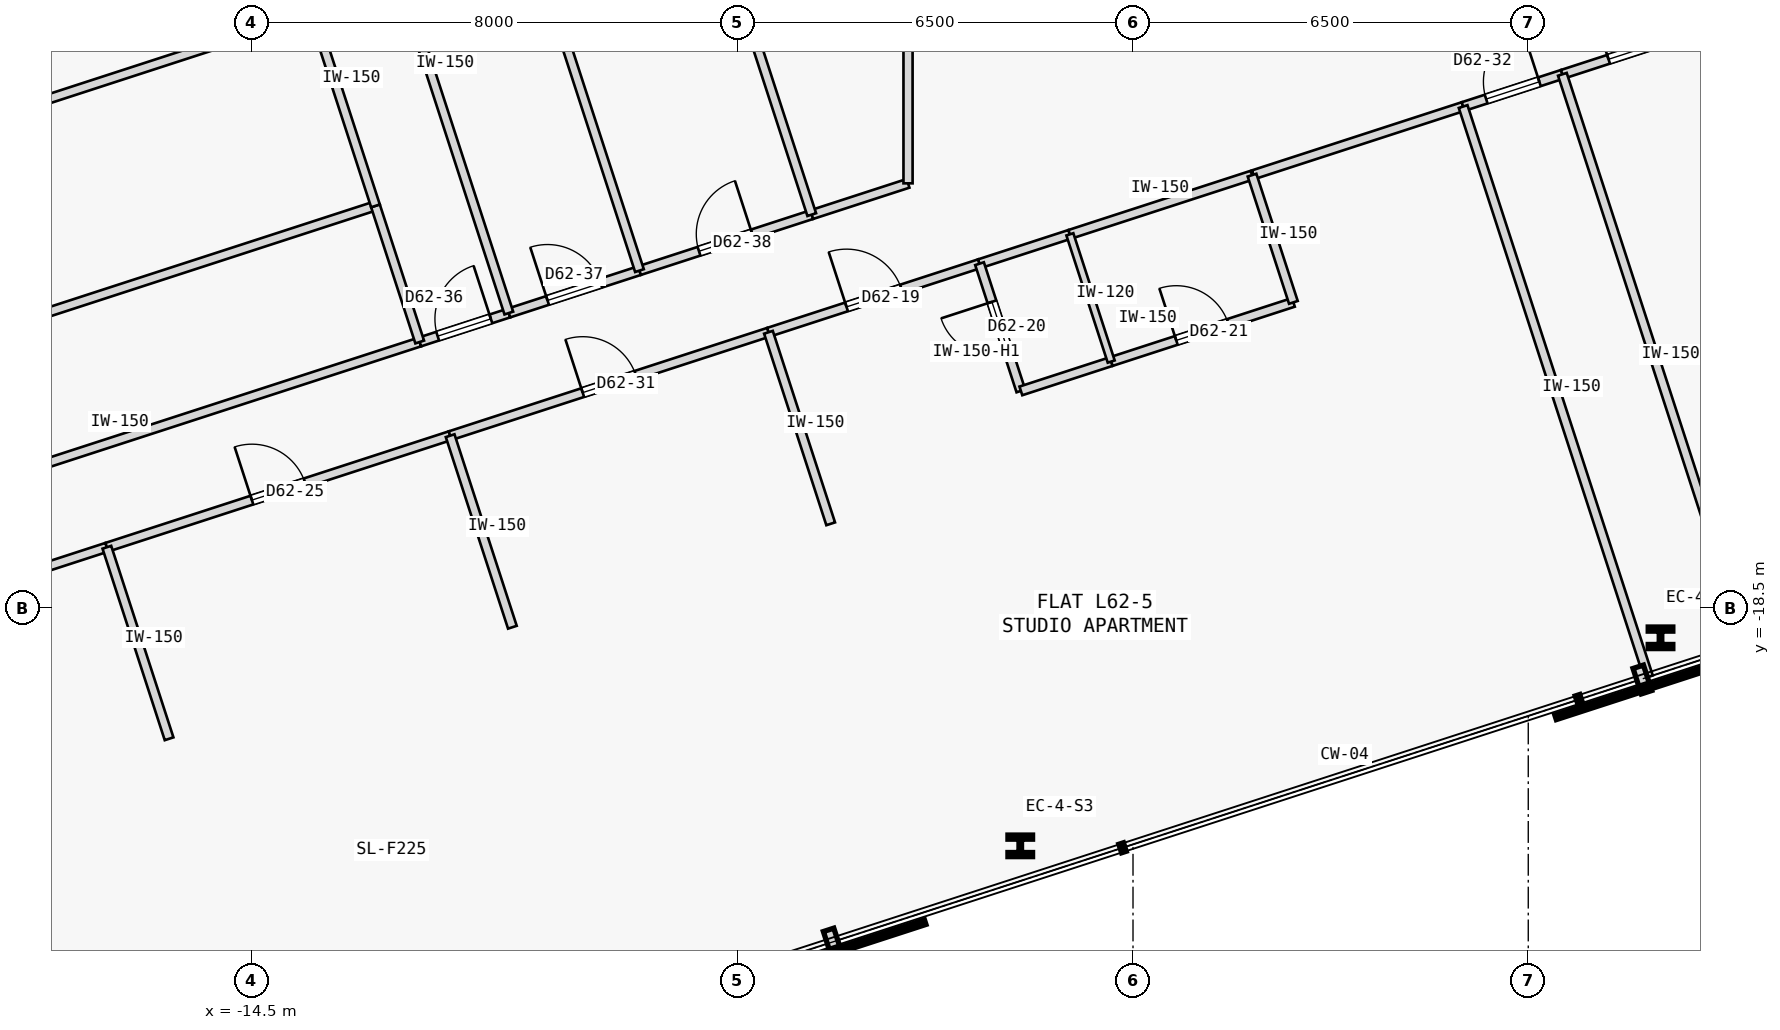
"""IFC4 building model, lengths in metres.
Left out: names, types, materials, properties, quantities, classifications, styles, units other than length and angle.
Written with IfcOpenShell. Run it as: python <this file> out.ifc"""

import sys

from ifc_helpers import new_model, si_unit, direction, frame, frame_2d, origin, origin_2d, place, context, subcontext, project, spatial, rectangle, i_section, extrude, element, fill, save


model = new_model("IFC4")
c1 = context("Model", 3, precision=1e-05, world=origin(), true_north=direction((0.0, 1.0)))
c2 = subcontext(c1, "Body", "Model", "MODEL_VIEW")
j1 = project(units=[si_unit("LENGTHUNIT", "METRE"), si_unit("PLANEANGLEUNIT", "RADIAN")], contexts=[c1])
p1 = place(None, origin())
s1 = spatial("IfcSite", under=j1, at=p1, CompositionType="ELEMENT")
p2 = place(p1, origin())
s2 = spatial("IfcBuilding", under=s1, at=p2, CompositionType="ELEMENT")
p3 = place(p2, frame((0.0, 0.0, 234.35)))
s3 = spatial("IfcBuildingStorey", under=s2, at=p3, CompositionType="ELEMENT", Elevation=234.35)
for number, where, z_axis, x_axis in (
    (1, (-1.854, -22.409, 0.0), (0.0, 0.0, 1.0), (1.0, 0.0, 0.0)),
    (2, (8.675, -18.988, 0.0), (0.0, 0.0, 1.0), (1.0, 0.0, 0.0)),
):
    element("IfcColumn", number, at=place(p3, frame(where, z_axis=z_axis, x_axis=x_axis)), inside=s3, PredefinedType="COLUMN", context=c2, shape_type="SweptSolid", body=[
        extrude(i_section(OverallWidth=0.405, OverallDepth=0.355, WebThickness=0.042, FlangeThickness=0.068, FilletRadius=0.015, at=origin_2d()), origin(), (0.0, 0.0, 1.0), 3.35),
    ])
p4 = place(p3, frame((-20.347, -18.626, 0.0), z_axis=(0.0, 0.0, 1.0), x_axis=(0.951057168147, 0.309014988174, 0.0)))
e3 = element("IfcWall", 3, at=p4, inside=s3, PredefinedType="PARTITIONING", context=c2, shape_type="SweptSolid", body=[
    extrude(rectangle(XDim=3.65, YDim=0.15, at=frame_2d((1.825, 0.0))), origin(), (0.0, 0.0, 1.0), 3.125),
])
p5 = place(p3, frame((-5.995, -13.963, 0.0), z_axis=(0.0, 0.0, 1.0), x_axis=(0.951050780541, 0.309034646652, 0.0)))
e4 = element("IfcWall", 4, at=p5, inside=s3, PredefinedType="PARTITIONING", context=c2, shape_type="SweptSolid", body=[
    extrude(rectangle(XDim=3.65, YDim=0.15, at=frame_2d((1.825, 0.0))), origin(), (0.0, 0.0, 1.0), 3.125),
])
p6 = place(p5, frame((1.35, 0.0, 0.0)))
e5 = element("IfcOpeningElement", 5, at=p6, cuts=e4, PredefinedType="OPENING", context=c2, shape_type="SweptSolid", body=[
    extrude(rectangle(XDim=0.95, YDim=2.15, at=frame_2d((0.475, 1.075))), frame((0.0, 0.085, 0.0), z_axis=(0.0, -1.0, 0.0), x_axis=(1.0, 0.0, 0.0)), (0.0, 0.0, 1.0), 0.17),
])
p7 = place(p3, frame((1.98, -11.372, 0.0), z_axis=(0.0, 0.0, 1.0), x_axis=(0.951052868128, 0.309028222052, 0.0)))
e6 = element("IfcWall", 6, at=p7, inside=s3, PredefinedType="PARTITIONING", context=c2, shape_type="SweptSolid", body=[
    extrude(rectangle(XDim=3.626, YDim=0.15, at=frame_2d((1.813, 0.0))), origin(), (0.0, 0.0, 1.0), 3.125),
])
p8 = place(p3, frame((-2.524, -12.835, 0.0), z_axis=(0.0, 0.0, 1.0), x_axis=(0.951062779317, 0.308997718112, 0.0)))
e7 = element("IfcWall", 7, at=p8, inside=s3, PredefinedType="PARTITIONING", context=c2, shape_type="SweptSolid", body=[
    extrude(rectangle(XDim=1.562, YDim=0.15, at=frame_2d((0.781, 0.0))), origin(), (0.0, 0.0, 1.0), 3.125),
])
p9 = place(p3, frame((-1.038, -12.352, 0.0), z_axis=(0.0, 0.0, 1.0), x_axis=(0.951058557014, 0.309010713619, 0.0)))
e8 = element("IfcWall", 8, at=p9, inside=s3, PredefinedType="PARTITIONING", context=c2, shape_type="SweptSolid", body=[
    extrude(rectangle(XDim=3.15, YDim=0.15, at=frame_2d((1.575, 0.0))), origin(), (0.0, 0.0, 1.0), 3.125),
])
p10 = place(p3, frame((-16.875, -17.498, 0.0), z_axis=(0.0, 0.0, 1.0), x_axis=(0.951057944303, 0.309012599384, 0.0)))
e9 = element("IfcWall", 9, at=p10, inside=s3, PredefinedType="PARTITIONING", context=c2, shape_type="SweptSolid", body=[
    extrude(rectangle(XDim=5.936, YDim=0.15, at=frame_2d((2.968, 0.0))), origin(), (0.0, 0.0, 1.0), 3.125),
])
p11 = place(p10, frame((2.508, 0.0, 0.0)))
e10 = element("IfcOpeningElement", 10, at=p11, cuts=e9, PredefinedType="OPENING", context=c2, shape_type="SweptSolid", body=[
    extrude(rectangle(XDim=0.92, YDim=2.15, at=frame_2d((0.46, 1.075))), frame((0.0, 0.085, 0.0), z_axis=(0.0, -1.0, 0.0), x_axis=(1.0, 0.0, 0.0)), (0.0, 0.0, 1.0), 0.17),
])
p12 = place(p3, frame((-29.45, -19.881, 0.0), z_axis=(0.0, 0.0, 1.0), x_axis=(0.95105650271, 0.309017036186, 0.0)))
e11 = element("IfcWall", 11, at=p12, inside=s3, PredefinedType="PARTITIONING", context=c2, shape_type="SweptSolid", body=[
    extrude(rectangle(XDim=18.632, YDim=0.15, at=frame_2d((9.316, 0.0))), origin(), (0.0, 0.0, 1.0), 3.125),
])
p13 = place(p12, frame((8.856, 0.0, 0.0)))
e12 = element("IfcOpeningElement", 12, at=p13, cuts=e11, PredefinedType="OPENING", context=c2, shape_type="SweptSolid", body=[
    extrude(rectangle(XDim=0.92, YDim=2.15, at=frame_2d((0.46, 1.075))), frame((0.0, 0.085, 0.0), z_axis=(0.0, -1.0, 0.0), x_axis=(1.0, 0.0, 0.0)), (0.0, 0.0, 1.0), 0.17),
])
p14 = place(p3, frame((-11.23, -15.664, 0.0), z_axis=(0.0, 0.0, 1.0), x_axis=(0.951055579382, 0.309019877882, 0.0)))
e13 = element("IfcWall", 13, at=p14, inside=s3, PredefinedType="PARTITIONING", context=c2, shape_type="SweptSolid", body=[
    extrude(rectangle(XDim=5.504, YDim=0.15, at=frame_2d((2.752, 0.0))), origin(), (0.0, 0.0, 1.0), 3.125),
])
p15 = place(p14, frame((2.292, 0.0, 0.0)))
e14 = element("IfcOpeningElement", 14, at=p15, cuts=e13, PredefinedType="OPENING", context=c2, shape_type="SweptSolid", body=[
    extrude(rectangle(XDim=0.92, YDim=2.15, at=frame_2d((0.46, 1.075))), frame((0.0, 0.085, 0.0), z_axis=(0.0, -1.0, 0.0), x_axis=(1.0, 0.0, 0.0)), (0.0, 0.0, 1.0), 0.17),
])
p16 = place(p3, frame((5.429, -10.251, 0.0), z_axis=(0.0, 0.0, 1.0), x_axis=(0.95104661559, 0.309047463953, 0.0)))
e15 = element("IfcWall", 15, at=p16, inside=s3, PredefinedType="PARTITIONING", context=c2, shape_type="SweptSolid", body=[
    extrude(rectangle(XDim=1.716, YDim=0.15, at=frame_2d((0.858, 0.0))), origin(), (0.0, 0.0, 1.0), 3.125),
])
p17 = place(p16, frame((0.398, 0.0, 0.0)))
e16 = element("IfcOpeningElement", 16, at=p17, cuts=e15, PredefinedType="OPENING", context=c2, shape_type="SweptSolid", body=[
    extrude(rectangle(XDim=0.92, YDim=2.15, at=frame_2d((0.46, 1.075))), frame((0.0, 0.085, 0.0), z_axis=(0.0, -1.0, 0.0), x_axis=(1.0, 0.0, 0.0)), (0.0, 0.0, 1.0), 0.17),
])
p18 = place(p3, frame((7.061, -9.721, 0.0), z_axis=(0.0, 0.0, 1.0), x_axis=(0.951051887333, 0.309031240494, 0.0)))
e17 = element("IfcWall", 17, at=p18, inside=s3, PredefinedType="PARTITIONING", context=c2, shape_type="SweptSolid", body=[
    extrude(rectangle(XDim=2.517, YDim=0.15, at=frame_2d((1.259, 0.0))), origin(), (0.0, 0.0, 1.0), 3.125),
])
p19 = place(p18, frame((0.799, 0.0, 0.0)))
e18 = element("IfcOpeningElement", 18, at=p19, cuts=e17, PredefinedType="OPENING", context=c2, shape_type="SweptSolid", body=[
    extrude(rectangle(XDim=0.92, YDim=2.15, at=frame_2d((0.46, 1.075))), frame((0.0, 0.085, 0.0), z_axis=(0.0, -1.0, 0.0), x_axis=(1.0, 0.0, 0.0)), (0.0, 0.0, 1.0), 0.17),
])
p20 = place(p3, frame((-11.73, -14.123, 0.0), z_axis=(0.0, 0.0, 1.0), x_axis=(0.951032904484, 0.309089654614, 0.0)))
e19 = element("IfcWall", 19, at=p20, inside=s3, PredefinedType="PARTITIONING", context=c2, shape_type="SweptSolid", body=[
    extrude(rectangle(XDim=1.541, YDim=0.15, at=frame_2d((0.771, 0.0))), origin(), (0.0, 0.0, 1.0), 3.125),
])
p21 = place(p20, frame((0.311, 0.0, 0.0)))
e20 = element("IfcOpeningElement", 20, at=p21, cuts=e19, PredefinedType="OPENING", context=c2, shape_type="SweptSolid", body=[
    extrude(rectangle(XDim=0.92, YDim=2.15, at=frame_2d((0.46, 1.075))), frame((0.0, 0.085, 0.0), z_axis=(0.0, -1.0, 0.0), x_axis=(1.0, 0.0, 0.0)), (0.0, 0.0, 1.0), 0.17),
])
p22 = place(p3, frame((-10.265, -13.647, 0.0), z_axis=(0.0, 0.0, 1.0), x_axis=(0.951065832698, 0.308988319964, 0.0)))
e21 = element("IfcWall", 21, at=p22, inside=s3, PredefinedType="PARTITIONING", context=c2, shape_type="SweptSolid", body=[
    extrude(rectangle(XDim=2.259, YDim=0.15, at=frame_2d((1.129, 0.0))), origin(), (0.0, 0.0, 1.0), 3.125),
])
p23 = place(p22, frame((0.669, 0.0, 0.0)))
e22 = element("IfcOpeningElement", 22, at=p23, cuts=e21, PredefinedType="OPENING", context=c2, shape_type="SweptSolid", body=[
    extrude(rectangle(XDim=0.92, YDim=2.15, at=frame_2d((0.46, 1.075))), frame((0.0, 0.085, 0.0), z_axis=(0.0, -1.0, 0.0), x_axis=(1.0, 0.0, 0.0)), (0.0, 0.0, 1.0), 0.17),
])
p24 = place(p3, frame((-8.116, -12.949, 0.0), z_axis=(0.0, 0.0, 1.0), x_axis=(0.95107320803, 0.308965617775, 0.0)))
e23 = element("IfcWall", 23, at=p24, inside=s3, PredefinedType="PARTITIONING", context=c2, shape_type="SweptSolid", body=[
    extrude(rectangle(XDim=2.979, YDim=0.15, at=frame_2d((1.49, 0.0))), origin(), (0.0, 0.0, 1.0), 3.125),
])
p25 = place(p24, frame((1.03, 0.0, 0.0)))
e24 = element("IfcOpeningElement", 24, at=p25, cuts=e23, PredefinedType="OPENING", context=c2, shape_type="SweptSolid", body=[
    extrude(rectangle(XDim=0.92, YDim=2.15, at=frame_2d((0.46, 1.075))), frame((0.0, 0.085, 0.0), z_axis=(0.0, -1.0, 0.0), x_axis=(1.0, 0.0, 0.0)), (0.0, 0.0, 1.0), 0.17),
])
p26 = place(p3, frame((-5.283, -12.028, 0.0), z_axis=(0.0, 0.0, 1.0), x_axis=(0.951031913627, 0.309092703349, 0.0)))
e25 = element("IfcWall", 25, at=p26, inside=s3, PredefinedType="PARTITIONING", context=c2, shape_type="SweptSolid", body=[
    extrude(rectangle(XDim=1.665, YDim=0.15, at=frame_2d((0.833, 0.0))), origin(), (0.0, 0.0, 1.0), 3.125),
])
p27 = place(p3, frame((-3.7, -11.514, 0.0), z_axis=(0.0, 0.0, 1.0), x_axis=(-8.2572974e-05, 0.999999996591, 0.0)))
e26 = element("IfcWall", 26, at=p27, inside=s3, PredefinedType="PARTITIONING", context=c2, shape_type="SweptSolid", body=[
    extrude(rectangle(XDim=5.913, YDim=0.15, at=frame_2d((2.957, 0.0))), origin(), (0.0, 0.0, 1.0), 3.125),
])
p28 = place(p27, frame((2.497, 0.0, 0.0)))
e27 = element("IfcOpeningElement", 27, at=p28, cuts=e26, PredefinedType="OPENING", context=c2, shape_type="SweptSolid", body=[
    extrude(rectangle(XDim=0.92, YDim=2.15, at=frame_2d((0.46, 1.075))), frame((0.0, 0.085, 0.0), z_axis=(0.0, -1.0, 0.0), x_axis=(1.0, 0.0, 0.0)), (0.0, 0.0, 1.0), 0.17),
])
p29 = place(p3, frame((-15.852, -20.648, 0.0), z_axis=(0.0, 0.0, 1.0), x_axis=(-0.309009398695, 0.951058984248, 0.0)))
e28 = element("IfcWall", 28, at=p29, inside=s3, PredefinedType="PARTITIONING", context=c2, shape_type="SweptSolid", body=[
    extrude(rectangle(XDim=3.312, YDim=0.15, at=frame_2d((1.656, 0.0))), origin(), (0.0, 0.0, 1.0), 3.125),
])
p30 = place(p3, frame((-1.844, -14.927, 0.0), z_axis=(0.0, 0.0, 1.0), x_axis=(-0.309060979314, 0.951042223598, 0.0)))
e29 = element("IfcWall", 29, at=p30, inside=s3, PredefinedType="PARTITIONING", context=c2, shape_type="SweptSolid", body=[
    extrude(rectangle(XDim=2.2, YDim=0.15, at=frame_2d((1.1, 0.0))), origin(), (0.0, 0.0, 1.0), 2.675),
])
p31 = place(p30, frame((0.66, 0.0, 0.0)))
e30 = element("IfcOpeningElement", 30, at=p31, cuts=e29, PredefinedType="OPENING", context=c2, shape_type="SweptSolid", body=[
    extrude(rectangle(XDim=0.88, YDim=2.15, at=frame_2d((0.44, 1.075))), frame((0.0, 0.085, 0.0), z_axis=(0.0, -1.0, 0.0), x_axis=(1.0, 0.0, 0.0)), (0.0, 0.0, 1.0), 0.17),
])
p32 = place(p3, frame((-1.844, -14.927, 0.0), z_axis=(0.0, 0.0, 1.0), x_axis=(0.951062779317, 0.308997718112, 0.0)))
e31 = element("IfcWall", 31, at=p32, inside=s3, PredefinedType="PARTITIONING", context=c2, shape_type="SweptSolid", body=[
    extrude(rectangle(XDim=1.562, YDim=0.15, at=frame_2d((0.781, 0.0))), origin(), (0.0, 0.0, 1.0), 3.125),
])
p33 = place(p3, frame((-0.358, -14.445, 0.0), z_axis=(0.0, 0.0, 1.0), x_axis=(0.951051155468, 0.309033492816, 0.0)))
e32 = element("IfcWall", 32, at=p33, inside=s3, PredefinedType="PARTITIONING", context=c2, shape_type="SweptSolid", body=[
    extrude(rectangle(XDim=3.15, YDim=0.15, at=frame_2d((1.575, 0.0))), origin(), (0.0, 0.0, 1.0), 3.125),
])
p34 = place(p33, frame((1.125, 0.0, 0.0)))
e33 = element("IfcOpeningElement", 33, at=p34, cuts=e32, PredefinedType="OPENING", context=c2, shape_type="SweptSolid", body=[
    extrude(rectangle(XDim=0.9, YDim=2.15, at=frame_2d((0.45, 1.075))), frame((0.0, 0.085, 0.0), z_axis=(0.0, -1.0, 0.0), x_axis=(1.0, 0.0, 0.0)), (0.0, 0.0, 1.0), 0.17),
])
p35 = place(p3, frame((2.637, -13.471, 0.0), z_axis=(0.0, 0.0, 1.0), x_axis=(-0.308960600764, 0.951074837842, 0.0)))
e34 = element("IfcWall", 34, at=p35, inside=s3, PredefinedType="PARTITIONING", context=c2, shape_type="SweptSolid", body=[
    extrude(rectangle(XDim=2.2, YDim=0.15, at=frame_2d((1.1, 0.0))), origin(), (0.0, 0.0, 1.0), 3.125),
])
p36 = place(p3, frame((-4.972, -17.113, 0.0), z_axis=(0.0, 0.0, 1.0), x_axis=(-0.309009398695, 0.951058984248, 0.0)))
e35 = element("IfcWall", 35, at=p36, inside=s3, PredefinedType="PARTITIONING", context=c2, shape_type="SweptSolid", body=[
    extrude(rectangle(XDim=3.312, YDim=0.15, at=frame_2d((1.656, 0.0))), origin(), (0.0, 0.0, 1.0), 3.125),
])
p37 = place(p3, frame((8.476, -19.63, 0.0), z_axis=(0.0, 0.0, 1.0), x_axis=(-0.308999867152, 0.951062081097, 0.0)))
e36 = element("IfcWall", 36, at=p37, inside=s3, PredefinedType="PARTITIONING", context=c2, shape_type="SweptSolid", body=[
    extrude(rectangle(XDim=9.862, YDim=0.15, at=frame_2d((4.931, 0.0))), origin(), (0.0, 0.0, 1.0), 3.125),
])
p38 = place(p3, frame((-0.358, -14.445, 0.0), z_axis=(0.0, 0.0, 1.0), x_axis=(-0.309060979314, 0.951042223598, 0.0)))
e37 = element("IfcWall", 37, at=p38, inside=s3, PredefinedType="PARTITIONING", context=c2, shape_type="SweptSolid", body=[
    extrude(rectangle(XDim=2.2, YDim=0.12, at=frame_2d((1.1, 0.0))), origin(), (0.0, 0.0, 1.0), 3.125),
])
p39 = place(p3, frame((-10.206, -18.814, 0.0), z_axis=(0.0, 0.0, 1.0), x_axis=(-0.309076071769, 0.951037318857, 0.0)))
e38 = element("IfcWall", 38, at=p39, inside=s3, PredefinedType="PARTITIONING", context=c2, shape_type="SweptSolid", body=[
    extrude(rectangle(XDim=3.312, YDim=0.15, at=frame_2d((1.656, 0.0))), origin(), (0.0, 0.0, 1.0), 3.125),
])
p40 = place(p3, frame((-30.178, -17.642, 0.0), z_axis=(0.0, 0.0, 1.0), x_axis=(0.95105650271, 0.309017036186, 0.0)))
e39 = element("IfcWall", 39, at=p40, inside=s3, PredefinedType="PARTITIONING", context=c2, shape_type="SweptSolid", body=[
    extrude(rectangle(XDim=18.632, YDim=0.15, at=frame_2d((9.316, 0.0))), origin(), (0.0, 0.0, 1.0), 3.125),
])
p41 = place(p40, frame((8.856, 0.0, 0.0)))
e40 = element("IfcOpeningElement", 40, at=p41, cuts=e39, PredefinedType="OPENING", context=c2, shape_type="SweptSolid", body=[
    extrude(rectangle(XDim=0.92, YDim=2.15, at=frame_2d((0.46, 1.075))), frame((0.0, 0.085, 0.0), z_axis=(0.0, -1.0, 0.0), x_axis=(1.0, 0.0, 0.0)), (0.0, 0.0, 1.0), 0.17),
])
p42 = place(p3, frame((-11.73, -14.123, 0.0), z_axis=(0.0, 0.0, 1.0), x_axis=(-0.309062621189, 0.951041690035, 0.0)))
e41 = element("IfcWall", 41, at=p42, inside=s3, PredefinedType="PARTITIONING", context=c2, shape_type="SweptSolid", body=[
    extrude(rectangle(XDim=2.354, YDim=0.15, at=frame_2d((1.177, 0.0))), origin(), (0.0, 0.0, 1.0), 3.125),
])
p43 = place(p3, frame((-31.208, -14.471, 0.0), z_axis=(0.0, 0.0, 1.0), x_axis=(0.951057753948, 0.309013185244, 0.0)))
e42 = element("IfcWall", 42, at=p43, inside=s3, PredefinedType="PARTITIONING", context=c2, shape_type="SweptSolid", body=[
    extrude(rectangle(XDim=18.632, YDim=0.15, at=frame_2d((9.316, 0.0))), origin(), (0.0, 0.0, 1.0), 3.125),
])
p44 = place(p3, frame((-12.458, -11.884, 0.0), z_axis=(0.0, 0.0, 1.0), x_axis=(-0.308946982245, 0.951079261766, 0.0)))
e43 = element("IfcWall", 43, at=p44, inside=s3, PredefinedType="PARTITIONING", context=c2, shape_type="SweptSolid", body=[
    extrude(rectangle(XDim=3.334, YDim=0.15, at=frame_2d((1.667, 0.0))), origin(), (0.0, 0.0, 1.0), 3.125),
])
p45 = place(p3, frame((-30.663, -9.757, 0.0), z_axis=(0.0, 0.0, 1.0), x_axis=(0.951058192995, 0.309011833974, 0.0)))
e44 = element("IfcWall", 44, at=p45, inside=s3, PredefinedType="PARTITIONING", context=c2, shape_type="SweptSolid", body=[
    extrude(rectangle(XDim=16.657, YDim=0.15, at=frame_2d((8.329, 0.0))), origin(), (0.0, 0.0, 1.0), 3.125),
])
p46 = place(p3, frame((10.108, -19.1, 0.0), z_axis=(0.0, 0.0, 1.0), x_axis=(-0.309022258842, 0.95105480575, 0.0)))
e45 = element("IfcWall", 45, at=p46, inside=s3, PredefinedType="PARTITIONING", context=c2, shape_type="SweptSolid", body=[
    extrude(rectangle(XDim=9.862, YDim=0.15, at=frame_2d((4.931, 0.0))), origin(), (0.0, 0.0, 1.0), 3.125),
])
p47 = place(p3, frame((-10.265, -13.647, 0.0), z_axis=(0.0, 0.0, 1.0), x_axis=(-0.309007776314, 0.951059511375, 0.0)))
e46 = element("IfcWall", 46, at=p47, inside=s3, PredefinedType="PARTITIONING", context=c2, shape_type="SweptSolid", body=[
    extrude(rectangle(XDim=8.461, YDim=0.15, at=frame_2d((4.23, 0.0))), origin(), (0.0, 0.0, 1.0), 3.125),
])
p48 = place(p3, frame((-8.116, -12.949, 0.0), z_axis=(0.0, 0.0, 1.0), x_axis=(-0.309005340707, 0.951060302722, 0.0)))
e47 = element("IfcWall", 47, at=p48, inside=s3, PredefinedType="PARTITIONING", context=c2, shape_type="SweptSolid", body=[
    extrude(rectangle(XDim=7.727, YDim=0.15, at=frame_2d((3.864, 0.0))), origin(), (0.0, 0.0, 1.0), 3.125),
])
p49 = place(p3, frame((-5.283, -12.028, 0.0), z_axis=(0.0, 0.0, 1.0), x_axis=(-0.30901256406, 0.95105795578, 0.0)))
e48 = element("IfcWall", 48, at=p49, inside=s3, PredefinedType="PARTITIONING", context=c2, shape_type="SweptSolid", body=[
    extrude(rectangle(XDim=6.759, YDim=0.15, at=frame_2d((3.379, 0.0))), origin(), (0.0, 0.0, 1.0), 3.125),
])
p50 = place(p6, origin())
e49 = element("IfcDoor", 49, at=p50, inside=s3, OperationType="SINGLE_SWING_LEFT", PredefinedType="DOOR", context=c2, shape_type="SweptSolid", body=[
    extrude(rectangle(XDim=0.95, YDim=2.15, at=frame_2d((0.475, 1.075))), frame((0.0, 0.025, 0.0), z_axis=(0.0, -1.0, 0.0), x_axis=(1.0, 0.0, 0.0)), (0.0, 0.0, 1.0), 0.05),
])
fill(e5, e49)
p51 = place(p31, origin())
e50 = element("IfcDoor", 50, at=p51, inside=s3, OperationType="SINGLE_SWING_RIGHT", PredefinedType="DOOR", context=c2, shape_type="SweptSolid", body=[
    extrude(rectangle(XDim=0.88, YDim=2.15, at=frame_2d((0.44, 1.075))), frame((0.0, 0.025, 0.0), z_axis=(0.0, -1.0, 0.0), x_axis=(1.0, 0.0, 0.0)), (0.0, 0.0, 1.0), 0.05),
])
fill(e30, e50)
p52 = place(p34, origin())
e51 = element("IfcDoor", 51, at=p52, inside=s3, OperationType="SINGLE_SWING_LEFT", PredefinedType="DOOR", context=c2, shape_type="SweptSolid", body=[
    extrude(rectangle(XDim=0.9, YDim=2.15, at=frame_2d((0.45, 1.075))), frame((0.0, 0.025, 0.0), z_axis=(0.0, -1.0, 0.0), x_axis=(1.0, 0.0, 0.0)), (0.0, 0.0, 1.0), 0.05),
])
fill(e33, e51)
p53 = place(p11, origin())
e52 = element("IfcDoor", 52, at=p53, inside=s3, OperationType="SINGLE_SWING_LEFT", PredefinedType="DOOR", context=c2, shape_type="SweptSolid", body=[
    extrude(rectangle(XDim=0.92, YDim=2.15, at=frame_2d((0.46, 1.075))), frame((0.0, 0.025, 0.0), z_axis=(0.0, -1.0, 0.0), x_axis=(1.0, 0.0, 0.0)), (0.0, 0.0, 1.0), 0.05),
])
fill(e10, e52)
p54 = place(p15, origin())
e53 = element("IfcDoor", 53, at=p54, inside=s3, OperationType="SINGLE_SWING_LEFT", PredefinedType="DOOR", context=c2, shape_type="SweptSolid", body=[
    extrude(rectangle(XDim=0.92, YDim=2.15, at=frame_2d((0.46, 1.075))), frame((0.0, 0.025, 0.0), z_axis=(0.0, -1.0, 0.0), x_axis=(1.0, 0.0, 0.0)), (0.0, 0.0, 1.0), 0.05),
])
fill(e14, e53)
p55 = place(p17, origin())
e54 = element("IfcDoor", 54, at=p55, inside=s3, OperationType="SINGLE_SWING_RIGHT", PredefinedType="DOOR", context=c2, shape_type="SweptSolid", body=[
    extrude(rectangle(XDim=0.92, YDim=2.15, at=frame_2d((0.46, 1.075))), frame((0.0, 0.025, 0.0), z_axis=(0.0, -1.0, 0.0), x_axis=(1.0, 0.0, 0.0)), (0.0, 0.0, 1.0), 0.05),
])
fill(e16, e54)
p56 = place(p19, origin())
e55 = element("IfcDoor", 55, at=p56, inside=s3, OperationType="SINGLE_SWING_LEFT", PredefinedType="DOOR", context=c2, shape_type="SweptSolid", body=[
    extrude(rectangle(XDim=0.92, YDim=2.15, at=frame_2d((0.46, 1.075))), frame((0.0, 0.025, 0.0), z_axis=(0.0, -1.0, 0.0), x_axis=(1.0, 0.0, 0.0)), (0.0, 0.0, 1.0), 0.05),
])
fill(e18, e55)
p57 = place(p21, origin())
e56 = element("IfcDoor", 56, at=p57, inside=s3, OperationType="SINGLE_SWING_RIGHT", PredefinedType="DOOR", context=c2, shape_type="SweptSolid", body=[
    extrude(rectangle(XDim=0.92, YDim=2.15, at=frame_2d((0.46, 1.075))), frame((0.0, 0.025, 0.0), z_axis=(0.0, -1.0, 0.0), x_axis=(1.0, 0.0, 0.0)), (0.0, 0.0, 1.0), 0.05),
])
fill(e20, e56)
p58 = place(p23, origin())
e57 = element("IfcDoor", 57, at=p58, inside=s3, OperationType="SINGLE_SWING_LEFT", PredefinedType="DOOR", context=c2, shape_type="SweptSolid", body=[
    extrude(rectangle(XDim=0.92, YDim=2.15, at=frame_2d((0.46, 1.075))), frame((0.0, 0.025, 0.0), z_axis=(0.0, -1.0, 0.0), x_axis=(1.0, 0.0, 0.0)), (0.0, 0.0, 1.0), 0.05),
])
fill(e22, e57)
p59 = place(p25, origin())
e58 = element("IfcDoor", 58, at=p59, inside=s3, OperationType="SINGLE_SWING_RIGHT", PredefinedType="DOOR", context=c2, shape_type="SweptSolid", body=[
    extrude(rectangle(XDim=0.92, YDim=2.15, at=frame_2d((0.46, 1.075))), frame((0.0, 0.025, 0.0), z_axis=(0.0, -1.0, 0.0), x_axis=(1.0, 0.0, 0.0)), (0.0, 0.0, 1.0), 0.05),
])
fill(e24, e58)
save(model, sys.argv[1])
